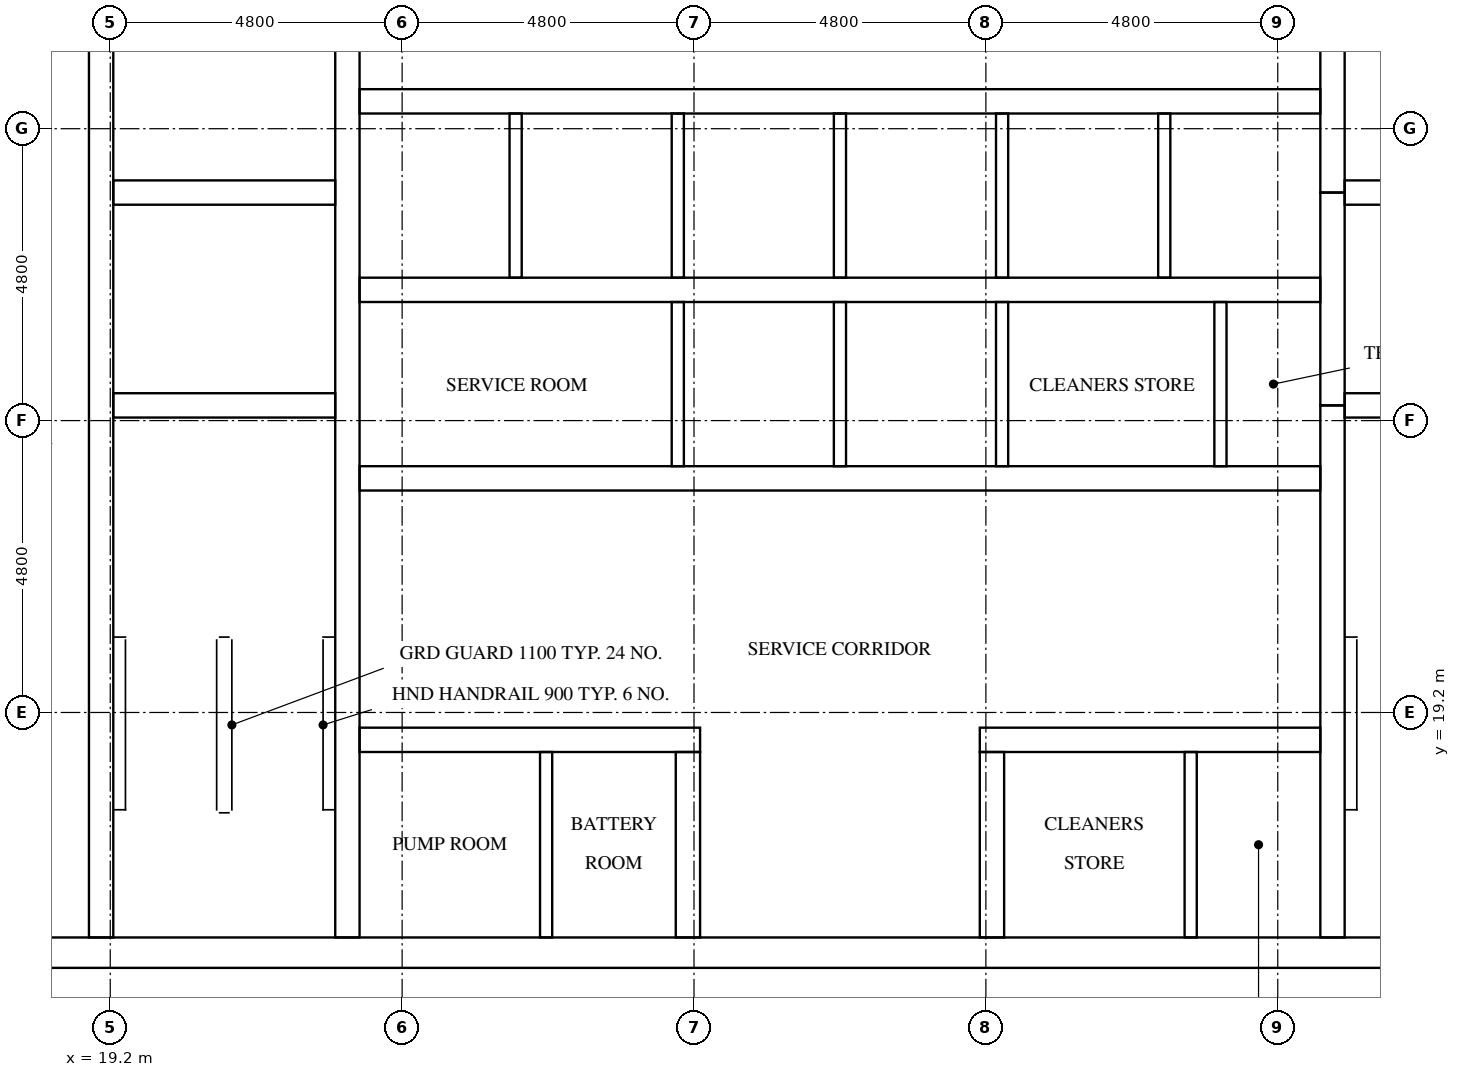
"""IFC4 building model, lengths in metres.
Left out: names, types, materials, properties, quantities, classifications, styles, units other than length and angle.
Written with IfcOpenShell. Run it as: python <this file> out.ifc"""

import sys

from ifc_helpers import new_model, si_unit, direction, frame, frame_2d, origin, place, context, subcontext, project, spatial, rectangle, extrude, element, fill, save


model = new_model("IFC4")
c1 = context("Model", 3, precision=1e-05, world=origin(), true_north=direction((0.0, 1.0)))
c2 = subcontext(c1, "Body", "Model", "MODEL_VIEW")
j1 = project(units=[si_unit("LENGTHUNIT", "METRE"), si_unit("PLANEANGLEUNIT", "RADIAN")], contexts=[c1])
p1 = place(None, origin())
s1 = spatial("IfcSite", under=j1, at=p1, CompositionType="ELEMENT")
p2 = place(p1, origin())
s2 = spatial("IfcBuilding", under=s1, at=p2, CompositionType="ELEMENT")
p3 = place(p2, frame((0.0, 0.0, 272.1)))
s3 = spatial("IfcBuildingStorey", under=s2, at=p3, CompositionType="ELEMENT", Elevation=272.1)
p4 = place(p3, frame((15.0, 15.25, 0.0), z_axis=(0.0, 0.0, 1.0), x_axis=(1.0, 0.0, 0.0)))
e1 = element("IfcWall", 1, at=p4, inside=s3, PredefinedType="SHEAR", context=c2, shape_type="SweptSolid", body=[
    extrude(rectangle(XDim=32.4, YDim=0.5, at=frame_2d((16.2, 0.0))), origin(), (0.0, 0.0, 1.0), 3.2),
])
p5 = place(p4, frame((15.3, 0.0, 0.0)))
e2 = element("IfcOpeningElement", 2, at=p5, cuts=e1, PredefinedType="OPENING", context=c2, shape_type="SweptSolid", body=[
    extrude(rectangle(XDim=1.8, YDim=2.1, at=frame_2d((0.9, 1.05))), frame((0.0, 0.26, 0.0), z_axis=(0.0, -1.0, 0.0), x_axis=(1.0, 0.0, 0.0)), (0.0, 0.0, 1.0), 0.52),
])
p6 = place(p3, frame((19.05, 15.5, 0.0), z_axis=(0.0, 0.0, 1.0), x_axis=(0.0, 1.0, 0.0)))
e3 = element("IfcWall", 3, at=p6, inside=s3, PredefinedType="SHEAR", context=c2, shape_type="SweptSolid", body=[
    extrude(rectangle(XDim=15.55, YDim=0.4, at=frame_2d((7.775, 0.0))), origin(), (0.0, 0.0, 1.0), 3.2),
])
p7 = place(p6, frame((9.95, 0.0, 0.0)))
e4 = element("IfcOpeningElement", 4, at=p7, cuts=e3, PredefinedType="OPENING", context=c2, shape_type="SweptSolid", body=[
    extrude(rectangle(XDim=1.1, YDim=2.1, at=frame_2d((0.55, 1.05))), frame((0.0, 0.21, 0.0), z_axis=(0.0, -1.0, 0.0), x_axis=(1.0, 0.0, 0.0)), (0.0, 0.0, 1.0), 0.42),
])
p8 = place(p6, frame((13.45, 0.0, 0.0)))
e5 = element("IfcOpeningElement", 5, at=p8, cuts=e3, PredefinedType="OPENING", context=c2, shape_type="SweptSolid", body=[
    extrude(rectangle(XDim=1.1, YDim=2.1, at=frame_2d((0.55, 1.05))), frame((0.0, 0.21, 0.0), z_axis=(0.0, -1.0, 0.0), x_axis=(1.0, 0.0, 0.0)), (0.0, 0.0, 1.0), 0.42),
])
p9 = place(p6, frame((0.7, 0.0, 0.0)))
e6 = element("IfcOpeningElement", 6, at=p9, cuts=e3, PredefinedType="OPENING", context=c2, shape_type="SweptSolid", body=[
    extrude(rectangle(XDim=1.2, YDim=2.1, at=frame_2d((0.6, 1.05))), frame((0.0, 0.21, 0.0), z_axis=(0.0, -1.0, 0.0), x_axis=(1.0, 0.0, 0.0)), (0.0, 0.0, 1.0), 0.42),
])
p10 = place(p3, frame((23.1, 15.5, 0.0), z_axis=(0.0, 0.0, 1.0), x_axis=(0.0, 1.0, 0.0)))
e7 = element("IfcWall", 7, at=p10, inside=s3, PredefinedType="SHEAR", context=c2, shape_type="SweptSolid", body=[
    extrude(rectangle(XDim=21.8, YDim=0.4, at=frame_2d((10.9, 0.0))), origin(), (0.0, 0.0, 1.0), 3.2),
])
p11 = place(p3, frame((39.3, 15.5, 0.0), z_axis=(0.0, 0.0, 1.0), x_axis=(0.0, 1.0, 0.0)))
e8 = element("IfcWall", 8, at=p11, inside=s3, PredefinedType="SHEAR", context=c2, shape_type="SweptSolid", body=[
    extrude(rectangle(XDim=8.75, YDim=0.4, at=frame_2d((4.375, 0.0))), origin(), (0.0, 0.0, 1.0), 3.2),
])
p12 = place(p3, frame((39.3, 24.25, 0.0), z_axis=(0.0, 0.0, 1.0), x_axis=(0.0, 1.0, 0.0)))
e9 = element("IfcWall", 9, at=p12, inside=s3, PredefinedType="SHEAR", context=c2, shape_type="SweptSolid", body=[
    extrude(rectangle(XDim=3.5, YDim=0.4, at=frame_2d((1.75, 0.0))), origin(), (0.0, 0.0, 1.0), 3.2),
])
p13 = place(p3, frame((39.3, 27.75, 0.0), z_axis=(0.0, 0.0, 1.0), x_axis=(0.0, 1.0, 0.0)))
e10 = element("IfcWall", 10, at=p13, inside=s3, PredefinedType="SHEAR", context=c2, shape_type="SweptSolid", body=[
    extrude(rectangle(XDim=9.55, YDim=0.4, at=frame_2d((4.775, 0.0))), origin(), (0.0, 0.0, 1.0), 3.2),
])
for number, where, z_axis, x_axis in (
    (11, (19.25, 24.25, 0.0), (0.0, 0.0, 1.0), (1.0, 0.0, 0.0)),
    (12, (19.25, 27.75, 0.0), (0.0, 0.0, 1.0), (1.0, 0.0, 0.0)),
    (13, (39.5, 24.25, 0.0), (0.0, 0.0, 1.0), (1.0, 0.0, 0.0)),
    (14, (39.5, 27.75, 0.0), (0.0, 0.0, 1.0), (1.0, 0.0, 0.0)),
):
    element("IfcWall", number, at=place(p3, frame(where, z_axis=z_axis, x_axis=x_axis)), inside=s3, PredefinedType="SHEAR", context=c2, shape_type="SweptSolid", body=[
        extrude(rectangle(XDim=3.65, YDim=0.4, at=frame_2d((1.825, 0.0))), origin(), (0.0, 0.0, 1.0), 3.2),
    ])
p14 = place(p3, frame((23.3, 18.75, 0.0), z_axis=(0.0, 0.0, 1.0), x_axis=(1.0, 0.0, 0.0)))
e15 = element("IfcWall", 15, at=p14, inside=s3, PredefinedType="SHEAR", context=c2, shape_type="SweptSolid", body=[
    extrude(rectangle(XDim=5.6, YDim=0.4, at=frame_2d((2.8, 0.0))), origin(), (0.0, 0.0, 1.0), 3.2),
])
p15 = place(p14, frame((0.984, 0.0, 0.0)))
e16 = element("IfcOpeningElement", 16, at=p15, cuts=e15, PredefinedType="OPENING", context=c2, shape_type="SweptSolid", body=[
    extrude(rectangle(XDim=1.0, YDim=2.1, at=frame_2d((0.5, 1.05))), frame((0.0, 0.21, 0.0), z_axis=(0.0, -1.0, 0.0), x_axis=(1.0, 0.0, 0.0)), (0.0, 0.0, 1.0), 0.42),
])
p16 = place(p14, frame((3.684, 0.0, 0.0)))
e17 = element("IfcOpeningElement", 17, at=p16, cuts=e15, PredefinedType="OPENING", context=c2, shape_type="SweptSolid", body=[
    extrude(rectangle(XDim=1.0, YDim=2.1, at=frame_2d((0.5, 1.05))), frame((0.0, 0.21, 0.0), z_axis=(0.0, -1.0, 0.0), x_axis=(1.0, 0.0, 0.0)), (0.0, 0.0, 1.0), 0.42),
])
p17 = place(p3, frame((33.5, 18.75, 0.0), z_axis=(0.0, 0.0, 1.0), x_axis=(1.0, 0.0, 0.0)))
e18 = element("IfcWall", 18, at=p17, inside=s3, PredefinedType="SHEAR", context=c2, shape_type="SweptSolid", body=[
    extrude(rectangle(XDim=5.6, YDim=0.4, at=frame_2d((2.8, 0.0))), origin(), (0.0, 0.0, 1.0), 3.2),
])
p18 = place(p17, frame((1.384, 0.0, 0.0)))
e19 = element("IfcOpeningElement", 19, at=p18, cuts=e18, PredefinedType="OPENING", context=c2, shape_type="SweptSolid", body=[
    extrude(rectangle(XDim=1.0, YDim=2.1, at=frame_2d((0.5, 1.05))), frame((0.0, 0.21, 0.0), z_axis=(0.0, -1.0, 0.0), x_axis=(1.0, 0.0, 0.0)), (0.0, 0.0, 1.0), 0.42),
])
p19 = place(p17, frame((4.084, 0.0, 0.0)))
e20 = element("IfcOpeningElement", 20, at=p19, cuts=e18, PredefinedType="OPENING", context=c2, shape_type="SweptSolid", body=[
    extrude(rectangle(XDim=1.0, YDim=2.1, at=frame_2d((0.5, 1.05))), frame((0.0, 0.21, 0.0), z_axis=(0.0, -1.0, 0.0), x_axis=(1.0, 0.0, 0.0)), (0.0, 0.0, 1.0), 0.42),
])
p20 = place(p3, frame((23.3, 23.05, 0.0), z_axis=(0.0, 0.0, 1.0), x_axis=(1.0, 0.0, 0.0)))
e21 = element("IfcWall", 21, at=p20, inside=s3, PredefinedType="SHEAR", context=c2, shape_type="SweptSolid", body=[
    extrude(rectangle(XDim=15.8, YDim=0.4, at=frame_2d((7.9, 0.0))), origin(), (0.0, 0.0, 1.0), 3.2),
])
p21 = place(p20, frame((2.067, 0.0, 0.0)))
e22 = element("IfcOpeningElement", 22, at=p21, cuts=e21, PredefinedType="OPENING", context=c2, shape_type="SweptSolid", body=[
    extrude(rectangle(XDim=1.0, YDim=2.1, at=frame_2d((0.5, 1.05))), frame((0.0, 0.21, 0.0), z_axis=(0.0, -1.0, 0.0), x_axis=(1.0, 0.0, 0.0)), (0.0, 0.0, 1.0), 0.42),
])
p22 = place(p20, frame((11.862, 0.0, 0.0)))
e23 = element("IfcOpeningElement", 23, at=p22, cuts=e21, PredefinedType="OPENING", context=c2, shape_type="SweptSolid", body=[
    extrude(rectangle(XDim=1.0, YDim=2.1, at=frame_2d((0.5, 1.05))), frame((0.0, 0.21, 0.0), z_axis=(0.0, -1.0, 0.0), x_axis=(1.0, 0.0, 0.0)), (0.0, 0.0, 1.0), 0.42),
])
p23 = place(p20, frame((14.529, 0.0, 0.0)))
e24 = element("IfcOpeningElement", 24, at=p23, cuts=e21, PredefinedType="OPENING", context=c2, shape_type="SweptSolid", body=[
    extrude(rectangle(XDim=1.0, YDim=2.1, at=frame_2d((0.5, 1.05))), frame((0.0, 0.21, 0.0), z_axis=(0.0, -1.0, 0.0), x_axis=(1.0, 0.0, 0.0)), (0.0, 0.0, 1.0), 0.42),
])
p24 = place(p3, frame((23.3, 26.15, 0.0), z_axis=(0.0, 0.0, 1.0), x_axis=(1.0, 0.0, 0.0)))
e25 = element("IfcWall", 25, at=p24, inside=s3, PredefinedType="SHEAR", context=c2, shape_type="SweptSolid", body=[
    extrude(rectangle(XDim=15.8, YDim=0.4, at=frame_2d((7.9, 0.0))), origin(), (0.0, 0.0, 1.0), 3.2),
])
p25 = place(p3, frame((23.3, 29.25, 0.0), z_axis=(0.0, 0.0, 1.0), x_axis=(1.0, 0.0, 0.0)))
e26 = element("IfcWall", 26, at=p25, inside=s3, PredefinedType="SHEAR", context=c2, shape_type="SweptSolid", body=[
    extrude(rectangle(XDim=15.8, YDim=0.4, at=frame_2d((7.9, 0.0))), origin(), (0.0, 0.0, 1.0), 3.2),
])
p26 = place(p25, frame((0.683, 0.0, 0.0)))
e27 = element("IfcOpeningElement", 27, at=p26, cuts=e26, PredefinedType="OPENING", context=c2, shape_type="SweptSolid", body=[
    extrude(rectangle(XDim=1.1, YDim=2.1, at=frame_2d((0.55, 1.05))), frame((0.0, 0.21, 0.0), z_axis=(0.0, -1.0, 0.0), x_axis=(1.0, 0.0, 0.0)), (0.0, 0.0, 1.0), 0.42),
])
p27 = place(p25, frame((3.35, 0.0, 0.0)))
e28 = element("IfcOpeningElement", 28, at=p27, cuts=e26, PredefinedType="OPENING", context=c2, shape_type="SweptSolid", body=[
    extrude(rectangle(XDim=1.1, YDim=2.1, at=frame_2d((0.55, 1.05))), frame((0.0, 0.21, 0.0), z_axis=(0.0, -1.0, 0.0), x_axis=(1.0, 0.0, 0.0)), (0.0, 0.0, 1.0), 0.42),
])
p28 = place(p25, frame((6.017, 0.0, 0.0)))
e29 = element("IfcOpeningElement", 29, at=p28, cuts=e26, PredefinedType="OPENING", context=c2, shape_type="SweptSolid", body=[
    extrude(rectangle(XDim=1.1, YDim=2.1, at=frame_2d((0.55, 1.05))), frame((0.0, 0.21, 0.0), z_axis=(0.0, -1.0, 0.0), x_axis=(1.0, 0.0, 0.0)), (0.0, 0.0, 1.0), 0.42),
])
p29 = place(p25, frame((8.683, 0.0, 0.0)))
e30 = element("IfcOpeningElement", 30, at=p29, cuts=e26, PredefinedType="OPENING", context=c2, shape_type="SweptSolid", body=[
    extrude(rectangle(XDim=1.1, YDim=2.1, at=frame_2d((0.55, 1.05))), frame((0.0, 0.21, 0.0), z_axis=(0.0, -1.0, 0.0), x_axis=(1.0, 0.0, 0.0)), (0.0, 0.0, 1.0), 0.42),
])
p30 = place(p25, frame((11.35, 0.0, 0.0)))
e31 = element("IfcOpeningElement", 31, at=p30, cuts=e26, PredefinedType="OPENING", context=c2, shape_type="SweptSolid", body=[
    extrude(rectangle(XDim=1.1, YDim=2.1, at=frame_2d((0.55, 1.05))), frame((0.0, 0.21, 0.0), z_axis=(0.0, -1.0, 0.0), x_axis=(1.0, 0.0, 0.0)), (0.0, 0.0, 1.0), 0.42),
])
p31 = place(p25, frame((14.017, 0.0, 0.0)))
e32 = element("IfcOpeningElement", 32, at=p31, cuts=e26, PredefinedType="OPENING", context=c2, shape_type="SweptSolid", body=[
    extrude(rectangle(XDim=1.1, YDim=2.1, at=frame_2d((0.55, 1.05))), frame((0.0, 0.21, 0.0), z_axis=(0.0, -1.0, 0.0), x_axis=(1.0, 0.0, 0.0)), (0.0, 0.0, 1.0), 0.42),
])
for number, where, z_axis, x_axis in (
    (33, (28.7, 15.5, 0.0), (0.0, 0.0, 1.0), (0.0, 1.0, 0.0)),
    (34, (33.7, 15.5, 0.0), (0.0, 0.0, 1.0), (0.0, 1.0, 0.0)),
):
    element("IfcWall", number, at=place(p3, frame(where, z_axis=z_axis, x_axis=x_axis)), inside=s3, PredefinedType="SHEAR", context=c2, shape_type="SweptSolid", body=[
        extrude(rectangle(XDim=3.05, YDim=0.4, at=frame_2d((1.525, 0.0))), origin(), (0.0, 0.0, 1.0), 3.2),
    ])
for number, where, z_axis, x_axis in (
    (35, (25.867, 26.35, 0.0), (0.0, 0.0, 1.0), (0.0, 1.0, 0.0)),
    (36, (28.533, 23.25, 0.0), (0.0, 0.0, 1.0), (0.0, 1.0, 0.0)),
    (37, (28.533, 26.35, 0.0), (0.0, 0.0, 1.0), (0.0, 1.0, 0.0)),
    (38, (31.2, 23.25, 0.0), (0.0, 0.0, 1.0), (0.0, 1.0, 0.0)),
    (39, (31.2, 26.35, 0.0), (0.0, 0.0, 1.0), (0.0, 1.0, 0.0)),
    (40, (33.867, 23.25, 0.0), (0.0, 0.0, 1.0), (0.0, 1.0, 0.0)),
    (41, (33.867, 26.35, 0.0), (0.0, 0.0, 1.0), (0.0, 1.0, 0.0)),
    (42, (36.533, 26.35, 0.0), (0.0, 0.0, 1.0), (0.0, 1.0, 0.0)),
):
    element("IfcWall", number, at=place(p3, frame(where, z_axis=z_axis, x_axis=x_axis)), inside=s3, PredefinedType="SOLIDWALL", context=c2, shape_type="SweptSolid", body=[
        extrude(rectangle(XDim=2.7, YDim=0.2, at=frame_2d((1.35, 0.0))), origin(), (0.0, 0.0, 1.0), 3.2),
    ])
p32 = place(p3, frame((37.457, 23.25, 0.0), z_axis=(0.0, 0.0, 1.0), x_axis=(0.0, 1.0, 0.0)))
e43 = element("IfcWall", 43, at=p32, inside=s3, PredefinedType="PARTITIONING", context=c2, shape_type="SweptSolid", body=[
    extrude(rectangle(XDim=2.7, YDim=0.2, at=frame_2d((1.35, 0.0))), origin(), (0.0, 0.0, 1.0), 3.2),
])
for number, where, z_axis, x_axis in (
    (44, (26.368, 15.5, 0.0), (0.0, 0.0, 1.0), (0.0, 1.0, 0.0)),
    (45, (36.968, 15.5, 0.0), (0.0, 0.0, 1.0), (0.0, 1.0, 0.0)),
):
    element("IfcWall", number, at=place(p3, frame(where, z_axis=z_axis, x_axis=x_axis)), inside=s3, PredefinedType="PARTITIONING", context=c2, shape_type="SweptSolid", body=[
        extrude(rectangle(XDim=3.05, YDim=0.2, at=frame_2d((1.525, 0.0))), origin(), (0.0, 0.0, 1.0), 3.2),
    ])
p33 = place(p26, origin())
e46 = element("IfcDoor", 46, at=p33, inside=s3, OperationType="DOUBLE_DOOR_SLIDING", PredefinedType="DOOR", context=c2, shape_type="SweptSolid", body=[
    extrude(rectangle(XDim=1.1, YDim=2.1, at=frame_2d((0.55, 1.05))), frame((0.0, 0.025, 0.0), z_axis=(0.0, -1.0, 0.0), x_axis=(1.0, 0.0, 0.0)), (0.0, 0.0, 1.0), 0.05),
])
fill(e27, e46)
p34 = place(p27, origin())
e47 = element("IfcDoor", 47, at=p34, inside=s3, OperationType="DOUBLE_DOOR_SLIDING", PredefinedType="DOOR", context=c2, shape_type="SweptSolid", body=[
    extrude(rectangle(XDim=1.1, YDim=2.1, at=frame_2d((0.55, 1.05))), frame((0.0, 0.025, 0.0), z_axis=(0.0, -1.0, 0.0), x_axis=(1.0, 0.0, 0.0)), (0.0, 0.0, 1.0), 0.05),
])
fill(e28, e47)
p35 = place(p28, origin())
e48 = element("IfcDoor", 48, at=p35, inside=s3, OperationType="DOUBLE_DOOR_SLIDING", PredefinedType="DOOR", context=c2, shape_type="SweptSolid", body=[
    extrude(rectangle(XDim=1.1, YDim=2.1, at=frame_2d((0.55, 1.05))), frame((0.0, 0.025, 0.0), z_axis=(0.0, -1.0, 0.0), x_axis=(1.0, 0.0, 0.0)), (0.0, 0.0, 1.0), 0.05),
])
fill(e29, e48)
p36 = place(p29, origin())
e49 = element("IfcDoor", 49, at=p36, inside=s3, OperationType="DOUBLE_DOOR_SLIDING", PredefinedType="DOOR", context=c2, shape_type="SweptSolid", body=[
    extrude(rectangle(XDim=1.1, YDim=2.1, at=frame_2d((0.55, 1.05))), frame((0.0, 0.025, 0.0), z_axis=(0.0, -1.0, 0.0), x_axis=(1.0, 0.0, 0.0)), (0.0, 0.0, 1.0), 0.05),
])
fill(e30, e49)
p37 = place(p30, origin())
e50 = element("IfcDoor", 50, at=p37, inside=s3, OperationType="DOUBLE_DOOR_SLIDING", PredefinedType="DOOR", context=c2, shape_type="SweptSolid", body=[
    extrude(rectangle(XDim=1.1, YDim=2.1, at=frame_2d((0.55, 1.05))), frame((0.0, 0.025, 0.0), z_axis=(0.0, -1.0, 0.0), x_axis=(1.0, 0.0, 0.0)), (0.0, 0.0, 1.0), 0.05),
])
fill(e31, e50)
p38 = place(p31, origin())
e51 = element("IfcDoor", 51, at=p38, inside=s3, OperationType="DOUBLE_DOOR_SLIDING", PredefinedType="DOOR", context=c2, shape_type="SweptSolid", body=[
    extrude(rectangle(XDim=1.1, YDim=2.1, at=frame_2d((0.55, 1.05))), frame((0.0, 0.025, 0.0), z_axis=(0.0, -1.0, 0.0), x_axis=(1.0, 0.0, 0.0)), (0.0, 0.0, 1.0), 0.05),
])
fill(e32, e51)
p39 = place(p7, origin())
e52 = element("IfcDoor", 52, at=p39, inside=s3, OperationType="DOUBLE_DOOR_SLIDING", PredefinedType="DOOR", context=c2, shape_type="SweptSolid", body=[
    extrude(rectangle(XDim=1.1, YDim=2.1, at=frame_2d((0.55, 1.05))), frame((0.0, 0.025, 0.0), z_axis=(0.0, -1.0, 0.0), x_axis=(1.0, 0.0, 0.0)), (0.0, 0.0, 1.0), 0.05),
])
fill(e4, e52)
p40 = place(p8, origin())
e53 = element("IfcDoor", 53, at=p40, inside=s3, OperationType="DOUBLE_DOOR_SLIDING", PredefinedType="DOOR", context=c2, shape_type="SweptSolid", body=[
    extrude(rectangle(XDim=1.1, YDim=2.1, at=frame_2d((0.55, 1.05))), frame((0.0, 0.025, 0.0), z_axis=(0.0, -1.0, 0.0), x_axis=(1.0, 0.0, 0.0)), (0.0, 0.0, 1.0), 0.05),
])
fill(e5, e53)
p41 = place(p9, frame((1.2, 0.0, 0.0), z_axis=(0.0, 0.0, 1.0), x_axis=(-1.0, 0.0, 0.0)))
e54 = element("IfcDoor", 54, at=p41, inside=s3, OperationType="SINGLE_SWING_LEFT", PredefinedType="DOOR", context=c2, shape_type="SweptSolid", body=[
    extrude(rectangle(XDim=1.2, YDim=2.1, at=frame_2d((0.6, 1.05))), frame((0.0, 0.025, 0.0), z_axis=(0.0, -1.0, 0.0), x_axis=(1.0, 0.0, 0.0)), (0.0, 0.0, 1.0), 0.05),
])
fill(e6, e54)
p42 = place(p5, frame((1.8, 0.0, 0.0), z_axis=(0.0, 0.0, 1.0), x_axis=(-1.0, 0.0, 0.0)))
e55 = element("IfcDoor", 55, at=p42, inside=s3, OperationType="DOUBLE_DOOR_SINGLE_SWING", PredefinedType="DOOR", context=c2, shape_type="SweptSolid", body=[
    extrude(rectangle(XDim=1.8, YDim=2.1, at=frame_2d((0.9, 1.05))), frame((0.0, 0.025, 0.0), z_axis=(0.0, -1.0, 0.0), x_axis=(1.0, 0.0, 0.0)), (0.0, 0.0, 1.0), 0.05),
])
fill(e2, e55)
p43 = place(p21, frame((1.0, 0.0, 0.0), z_axis=(0.0, 0.0, 1.0), x_axis=(-1.0, 0.0, 0.0)))
e56 = element("IfcDoor", 56, at=p43, inside=s3, OperationType="SINGLE_SWING_RIGHT", PredefinedType="DOOR", context=c2, shape_type="SweptSolid", body=[
    extrude(rectangle(XDim=1.0, YDim=2.1, at=frame_2d((0.5, 1.05))), frame((0.0, 0.025, 0.0), z_axis=(0.0, -1.0, 0.0), x_axis=(1.0, 0.0, 0.0)), (0.0, 0.0, 1.0), 0.05),
])
fill(e22, e56)
p44 = place(p22, frame((1.0, 0.0, 0.0), z_axis=(0.0, 0.0, 1.0), x_axis=(-1.0, 0.0, 0.0)))
e57 = element("IfcDoor", 57, at=p44, inside=s3, OperationType="SINGLE_SWING_LEFT", PredefinedType="DOOR", context=c2, shape_type="SweptSolid", body=[
    extrude(rectangle(XDim=1.0, YDim=2.1, at=frame_2d((0.5, 1.05))), frame((0.0, 0.025, 0.0), z_axis=(0.0, -1.0, 0.0), x_axis=(1.0, 0.0, 0.0)), (0.0, 0.0, 1.0), 0.05),
])
fill(e23, e57)
p45 = place(p23, frame((1.0, 0.0, 0.0), z_axis=(0.0, 0.0, 1.0), x_axis=(-1.0, 0.0, 0.0)))
e58 = element("IfcDoor", 58, at=p45, inside=s3, OperationType="SINGLE_SWING_RIGHT", PredefinedType="DOOR", context=c2, shape_type="SweptSolid", body=[
    extrude(rectangle(XDim=1.0, YDim=2.1, at=frame_2d((0.5, 1.05))), frame((0.0, 0.025, 0.0), z_axis=(0.0, -1.0, 0.0), x_axis=(1.0, 0.0, 0.0)), (0.0, 0.0, 1.0), 0.05),
])
fill(e24, e58)
p46 = place(p15, origin())
e59 = element("IfcDoor", 59, at=p46, inside=s3, OperationType="SINGLE_SWING_LEFT", PredefinedType="DOOR", context=c2, shape_type="SweptSolid", body=[
    extrude(rectangle(XDim=1.0, YDim=2.1, at=frame_2d((0.5, 1.05))), frame((0.0, 0.025, 0.0), z_axis=(0.0, -1.0, 0.0), x_axis=(1.0, 0.0, 0.0)), (0.0, 0.0, 1.0), 0.05),
])
fill(e16, e59)
p47 = place(p16, origin())
e60 = element("IfcDoor", 60, at=p47, inside=s3, OperationType="SINGLE_SWING_RIGHT", PredefinedType="DOOR", context=c2, shape_type="SweptSolid", body=[
    extrude(rectangle(XDim=1.0, YDim=2.1, at=frame_2d((0.5, 1.05))), frame((0.0, 0.025, 0.0), z_axis=(0.0, -1.0, 0.0), x_axis=(1.0, 0.0, 0.0)), (0.0, 0.0, 1.0), 0.05),
])
fill(e17, e60)
p48 = place(p18, origin())
e61 = element("IfcDoor", 61, at=p48, inside=s3, OperationType="SINGLE_SWING_LEFT", PredefinedType="DOOR", context=c2, shape_type="SweptSolid", body=[
    extrude(rectangle(XDim=1.0, YDim=2.1, at=frame_2d((0.5, 1.05))), frame((0.0, 0.025, 0.0), z_axis=(0.0, -1.0, 0.0), x_axis=(1.0, 0.0, 0.0)), (0.0, 0.0, 1.0), 0.05),
])
fill(e19, e61)
p49 = place(p19, origin())
e62 = element("IfcDoor", 62, at=p49, inside=s3, OperationType="SINGLE_SWING_RIGHT", PredefinedType="DOOR", context=c2, shape_type="SweptSolid", body=[
    extrude(rectangle(XDim=1.0, YDim=2.1, at=frame_2d((0.5, 1.05))), frame((0.0, 0.025, 0.0), z_axis=(0.0, -1.0, 0.0), x_axis=(1.0, 0.0, 0.0)), (0.0, 0.0, 1.0), 0.05),
])
fill(e20, e62)
save(model, sys.argv[1])
